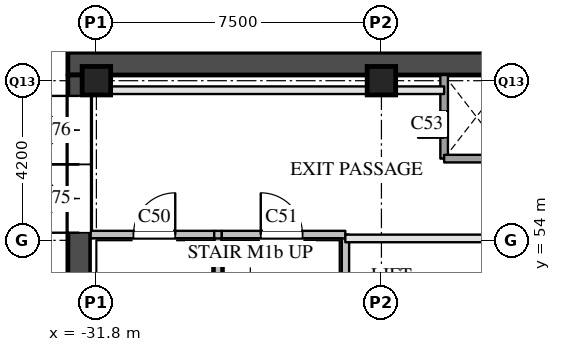
"""IFC4 building model, lengths in metres.
Left out: names, types, materials, properties, quantities, classifications, styles, units other than length and angle.
Written with IfcOpenShell. Run it as: python <this file> out.ifc"""

import sys

from ifc_helpers import new_model, si_unit, direction, frame, frame_2d, origin, origin_2d, place, context, subcontext, project, spatial, rectangle, extrude, element, fill, save


model = new_model("IFC4")
c1 = context("Model", 3, precision=1e-05, world=origin(), true_north=direction((0.0, 1.0)))
c2 = subcontext(c1, "Body", "Model", "MODEL_VIEW")
j1 = project(units=[si_unit("LENGTHUNIT", "METRE"), si_unit("PLANEANGLEUNIT", "RADIAN")], contexts=[c1])
p1 = place(None, origin())
s1 = spatial("IfcSite", under=j1, at=p1, CompositionType="ELEMENT")
p2 = place(p1, origin())
s2 = spatial("IfcBuilding", under=s1, at=p2, CompositionType="ELEMENT")
p3 = place(p2, origin())
s3 = spatial("IfcBuildingStorey", under=s2, at=p3, CompositionType="ELEMENT", Elevation=0.0)
for number, where, z_axis, x_axis in (
    (1, (-31.8, 58.2, 0.0), (0.0, 0.0, 1.0), (1.0, 0.0, 0.0)),
    (2, (-24.3, 58.2, 0.0), (0.0, 0.0, 1.0), (1.0, 0.0, 0.0)),
):
    element("IfcColumn", number, at=place(p3, frame(where, z_axis=z_axis, x_axis=x_axis)), inside=s3, PredefinedType="COLUMN", context=c2, shape_type="SweptSolid", body=[
        extrude(rectangle(XDim=0.75, YDim=0.75, at=origin_2d()), origin(), (0.0, 0.0, 1.0), 8.0),
    ])
p4 = place(p3, frame((-32.55, 58.65, 0.0), z_axis=(0.0, 0.0, 1.0), x_axis=(1.0, 0.0, 0.0)))
e3 = element("IfcWall", 3, at=p4, inside=s3, PredefinedType="SHEAR", context=c2, shape_type="SweptSolid", body=[
    extrude(rectangle(XDim=12.2, YDim=0.6, at=frame_2d((6.1, 0.0))), origin(), (0.0, 0.0, 1.0), 7.59),
])
p5 = place(p3, frame((-32.25, 47.95, 0.0), z_axis=(0.0, 0.0, 1.0), x_axis=(0.0, 1.0, 0.0)))
e4 = element("IfcWall", 4, at=p5, inside=s3, PredefinedType="SHEAR", context=c2, shape_type="SweptSolid", body=[
    extrude(rectangle(XDim=10.4, YDim=0.6, at=frame_2d((5.2, 0.0))), origin(), (0.0, 0.0, 1.0), 7.59),
])
p6 = place(p5, frame((6.25, 0.0, 0.0)))
e5 = element("IfcOpeningElement", 5, at=p6, cuts=e4, PredefinedType="OPENING", context=c2, shape_type="SweptSolid", body=[
    extrude(rectangle(XDim=1.8, YDim=2.4, at=frame_2d((0.9, 1.2))), frame((0.0, 0.31, 0.0), z_axis=(0.0, -1.0, 0.0), x_axis=(1.0, 0.0, 0.0)), (0.0, 0.0, 1.0), 0.62),
])
p7 = place(p5, frame((8.05, 0.0, 0.0)))
e6 = element("IfcOpeningElement", 6, at=p7, cuts=e4, PredefinedType="OPENING", context=c2, shape_type="SweptSolid", body=[
    extrude(rectangle(XDim=1.8, YDim=2.4, at=frame_2d((0.9, 1.2))), frame((0.0, 0.31, 0.0), z_axis=(0.0, -1.0, 0.0), x_axis=(1.0, 0.0, 0.0)), (0.0, 0.0, 1.0), 0.62),
])
for number, where, z_axis, x_axis in (
    (7, (-28.6, 52.55, 0.0), (0.0, 0.0, 1.0), (0.0, 1.0, 0.0)),
    (8, (-25.25, 52.55, 0.0), (0.0, 0.0, 1.0), (0.0, 1.0, 0.0)),
):
    element("IfcWall", number, at=place(p3, frame(where, z_axis=z_axis, x_axis=x_axis)), inside=s3, PredefinedType="SOLIDWALL", context=c2, shape_type="SweptSolid", body=[
        extrude(rectangle(XDim=1.6, YDim=0.2, at=frame_2d((0.8, 0.0))), origin(), (0.0, 0.0, 1.0), 7.59),
    ])
p8 = place(p3, frame((-22.65, 56.15, 0.0), z_axis=(0.0, 0.0, 1.0), x_axis=(0.0, 1.0, 0.0)))
e9 = element("IfcWall", 9, at=p8, inside=s3, PredefinedType="SOLIDWALL", context=c2, shape_type="SweptSolid", body=[
    extrude(rectangle(XDim=2.2, YDim=0.2, at=frame_2d((1.1, 0.0))), origin(), (0.0, 0.0, 1.0), 7.59),
])
p9 = place(p8, frame((0.55, 0.0, 0.0)))
e10 = element("IfcOpeningElement", 10, at=p9, cuts=e9, PredefinedType="OPENING", context=c2, shape_type="SweptSolid", body=[
    extrude(rectangle(XDim=0.7, YDim=2.1, at=frame_2d((0.35, 1.05))), frame((0.0, 0.11, 0.0), z_axis=(0.0, -1.0, 0.0), x_axis=(1.0, 0.0, 0.0)), (0.0, 0.0, 1.0), 0.22),
])
p10 = place(p3, frame((-25.25, 54.05, 0.0), z_axis=(0.0, 0.0, 1.0), x_axis=(1.0, 0.0, 0.0)))
e11 = element("IfcWall", 11, at=p10, inside=s3, PredefinedType="PARTITIONING", context=c2, shape_type="SweptSolid", body=[
    extrude(rectangle(XDim=4.3, YDim=0.2, at=frame_2d((2.15, 0.0))), origin(), (0.0, 0.0, 1.0), 7.59),
])
p11 = place(p3, frame((-31.95, 54.15, 0.0), z_axis=(0.0, 0.0, 1.0), x_axis=(1.0, 0.0, 0.0)))
e12 = element("IfcWall", 12, at=p11, inside=s3, PredefinedType="SOLIDWALL", context=c2, shape_type="SweptSolid", body=[
    extrude(rectangle(XDim=3.25, YDim=0.2, at=frame_2d((1.625, 0.0))), origin(), (0.0, 0.0, 1.0), 7.59),
])
p12 = place(p11, frame((1.125, 0.0, 0.0)))
e13 = element("IfcOpeningElement", 13, at=p12, cuts=e12, PredefinedType="OPENING", context=c2, shape_type="SweptSolid", body=[
    extrude(rectangle(XDim=1.1, YDim=2.1, at=frame_2d((0.55, 1.05))), frame((0.0, 0.11, 0.0), z_axis=(0.0, -1.0, 0.0), x_axis=(1.0, 0.0, 0.0)), (0.0, 0.0, 1.0), 0.22),
])
p13 = place(p3, frame((-28.7, 54.15, 0.0), z_axis=(0.0, 0.0, 1.0), x_axis=(1.0, 0.0, 0.0)))
e14 = element("IfcWall", 14, at=p13, inside=s3, PredefinedType="SOLIDWALL", context=c2, shape_type="SweptSolid", body=[
    extrude(rectangle(XDim=0.2, YDim=0.2, at=frame_2d((0.1, 0.0))), origin(), (0.0, 0.0, 1.0), 7.59),
])
p14 = place(p3, frame((-28.5, 54.15, 0.0), z_axis=(0.0, 0.0, 1.0), x_axis=(1.0, 0.0, 0.0)))
e15 = element("IfcWall", 15, at=p14, inside=s3, PredefinedType="SOLIDWALL", context=c2, shape_type="SweptSolid", body=[
    extrude(rectangle(XDim=3.25, YDim=0.2, at=frame_2d((1.625, 0.0))), origin(), (0.0, 0.0, 1.0), 7.59),
])
p15 = place(p14, frame((1.025, 0.0, 0.0)))
e16 = element("IfcOpeningElement", 16, at=p15, cuts=e15, PredefinedType="OPENING", context=c2, shape_type="SweptSolid", body=[
    extrude(rectangle(XDim=1.1, YDim=2.1, at=frame_2d((0.55, 1.05))), frame((0.0, 0.11, 0.0), z_axis=(0.0, -1.0, 0.0), x_axis=(1.0, 0.0, 0.0)), (0.0, 0.0, 1.0), 0.22),
])
p16 = place(p3, frame((-22.65, 56.15, 0.0), z_axis=(0.0, 0.0, 1.0), x_axis=(1.0, 0.0, 0.0)))
e17 = element("IfcWall", 17, at=p16, inside=s3, PredefinedType="SOLIDWALL", context=c2, shape_type="SweptSolid", body=[
    extrude(rectangle(XDim=1.7, YDim=0.2, at=frame_2d((0.85, 0.0))), origin(), (0.0, 0.0, 1.0), 7.59),
])
p17 = place(p3, frame((-31.95, 57.95, 0.0), z_axis=(0.0, 0.0, 1.0), x_axis=(1.0, 0.0, 0.0)))
e18 = element("IfcWall", 18, at=p17, inside=s3, PredefinedType="PARTITIONING", context=c2, shape_type="SweptSolid", body=[
    extrude(rectangle(XDim=9.3, YDim=0.2, at=frame_2d((4.65, 0.0))), origin(), (0.0, 0.0, 1.0), 7.59),
])
p18 = place(p12, origin())
e19 = element("IfcDoor", 19, at=p18, inside=s3, OperationType="SINGLE_SWING_RIGHT", PredefinedType="DOOR", context=c2, shape_type="SweptSolid", body=[
    extrude(rectangle(XDim=1.1, YDim=2.1, at=frame_2d((0.55, 1.05))), frame((0.0, 0.025, 0.0), z_axis=(0.0, -1.0, 0.0), x_axis=(1.0, 0.0, 0.0)), (0.0, 0.0, 1.0), 0.05),
])
fill(e13, e19)
p19 = place(p15, origin())
e20 = element("IfcDoor", 20, at=p19, inside=s3, OperationType="SINGLE_SWING_LEFT", PredefinedType="DOOR", context=c2, shape_type="SweptSolid", body=[
    extrude(rectangle(XDim=1.1, YDim=2.1, at=frame_2d((0.55, 1.05))), frame((0.0, 0.025, 0.0), z_axis=(0.0, -1.0, 0.0), x_axis=(1.0, 0.0, 0.0)), (0.0, 0.0, 1.0), 0.05),
])
fill(e16, e20)
p20 = place(p9, origin())
e21 = element("IfcDoor", 21, at=p20, inside=s3, OperationType="SINGLE_SWING_LEFT", PredefinedType="DOOR", context=c2, shape_type="SweptSolid", body=[
    extrude(rectangle(XDim=0.7, YDim=2.1, at=frame_2d((0.35, 1.05))), frame((0.0, 0.025, 0.0), z_axis=(0.0, -1.0, 0.0), x_axis=(1.0, 0.0, 0.0)), (0.0, 0.0, 1.0), 0.05),
])
fill(e10, e21)
p21 = place(p6, origin())
e22 = element("IfcDoor", 22, at=p21, inside=s3, OperationType="DOUBLE_DOOR_SINGLE_SWING", PredefinedType="DOOR", context=c2, shape_type="SweptSolid", body=[
    extrude(rectangle(XDim=1.8, YDim=2.4, at=frame_2d((0.9, 1.2))), frame((0.0, 0.025, 0.0), z_axis=(0.0, -1.0, 0.0), x_axis=(1.0, 0.0, 0.0)), (0.0, 0.0, 1.0), 0.05),
])
fill(e5, e22)
p22 = place(p7, origin())
e23 = element("IfcDoor", 23, at=p22, inside=s3, OperationType="DOUBLE_DOOR_SINGLE_SWING", PredefinedType="DOOR", context=c2, shape_type="SweptSolid", body=[
    extrude(rectangle(XDim=1.8, YDim=2.4, at=frame_2d((0.9, 1.2))), frame((0.0, 0.025, 0.0), z_axis=(0.0, -1.0, 0.0), x_axis=(1.0, 0.0, 0.0)), (0.0, 0.0, 1.0), 0.05),
])
fill(e6, e23)
save(model, sys.argv[1])
